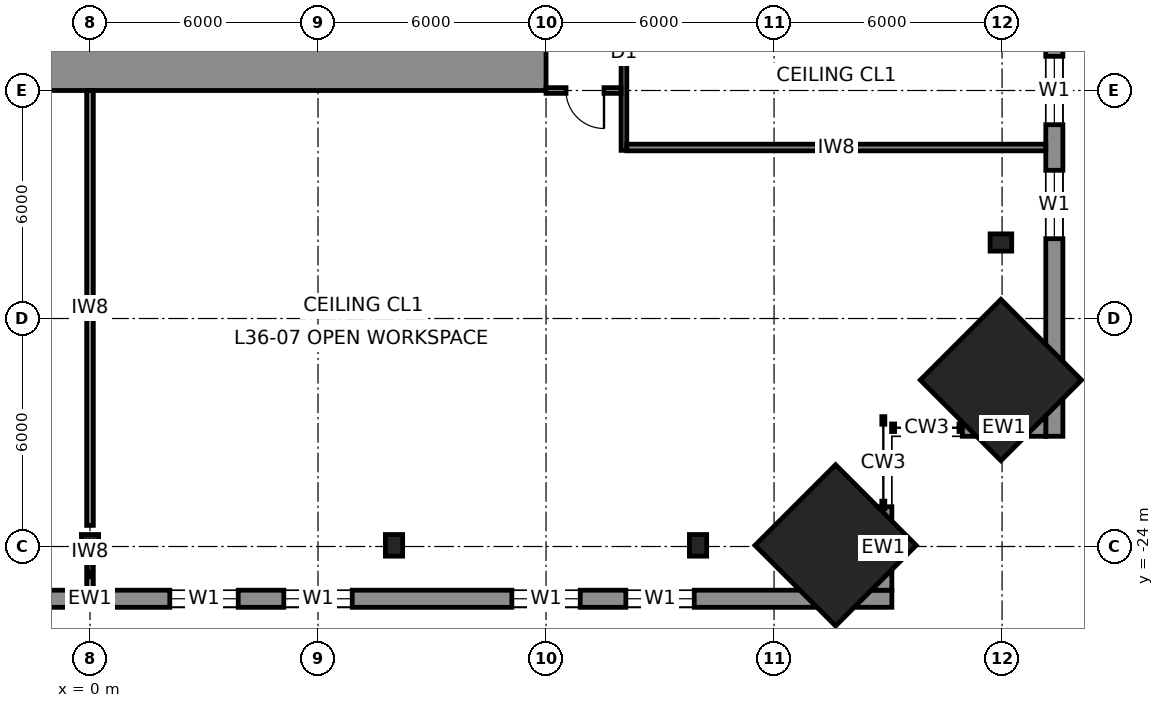
"""IFC4 building model, lengths in metres.
Left out: names, types, materials, properties, quantities, classifications, styles, units other than length and angle.
Written with IfcOpenShell. Run it as: python <this file> out.ifc"""

import sys

from ifc_helpers import new_model, si_unit, direction, frame, frame_2d, origin, origin_2d, place, context, subcontext, project, spatial, rectangle, i_section, extrude, element, fill, save


model = new_model("IFC4")
c1 = context("Model", 3, precision=1e-05, world=origin(), true_north=direction((0.0, 1.0)))
c2 = subcontext(c1, "Body", "Model", "MODEL_VIEW")
j1 = project(units=[si_unit("LENGTHUNIT", "METRE"), si_unit("PLANEANGLEUNIT", "RADIAN")], contexts=[c1])
p1 = place(None, origin())
s1 = spatial("IfcSite", under=j1, at=p1, CompositionType="ELEMENT")
p2 = place(p1, origin())
s2 = spatial("IfcBuilding", under=s1, at=p2, CompositionType="ELEMENT")
p3 = place(p2, frame((0.0, 0.0, 171.8)))
s3 = spatial("IfcBuildingStorey", under=s2, at=p3, CompositionType="ELEMENT", Elevation=171.8)
for number, where, z_axis, x_axis in (
    (1, (23.969, -19.619, 0.0), (-0.04, 0.04, 0.998), (-0.708, -0.707, 0.0)),
    (2, (19.619, -23.969, 0.0), (-0.04, 0.04, 0.998), (-0.707, -0.708, 0.0)),
):
    element("IfcColumn", number, at=place(p3, frame(where, z_axis=z_axis, x_axis=x_axis)), inside=s3, PredefinedType="COLUMN", context=c2, shape_type="SweptSolid", body=[
        extrude(rectangle(XDim=3.0, YDim=3.0, at=origin_2d()), origin(), (0.0, 0.0, 1.0), 4.007),
    ])
for number, where, z_axis, x_axis in (
    (3, (23.969, -16.0, 0.0), (-0.04, 0.0, 0.999), (0.0, -1.0, 0.0)),
    (4, (0.0, -23.969, 0.0), (0.0, 0.04, 0.999), (-1.0, 0.0, 0.0)),
    (5, (8.0, -23.969, 0.0), (0.0, 0.04, 0.999), (-1.0, 0.0, 0.0)),
    (6, (16.0, -23.969, 0.0), (0.0, 0.04, 0.999), (-1.0, 0.0, 0.0)),
):
    element("IfcColumn", number, at=place(p3, frame(where, z_axis=z_axis, x_axis=x_axis)), inside=s3, PredefinedType="COLUMN", context=c2, shape_type="SweptSolid", body=[
        extrude(i_section(OverallWidth=0.454, OverallDepth=0.569, WebThickness=0.078, FlangeThickness=0.125, at=origin_2d()), origin(), (0.0, 0.0, 1.0), 4.003),
    ])
p4 = place(p3, frame((12.0, -11.25, 0.0), z_axis=(0.0, 0.0, 1.0), x_axis=(-1.0, 0.0, 0.0)))
e7 = element("IfcWall", 7, at=p4, inside=s3, PredefinedType="SHEAR", context=c2, shape_type="SweptSolid", body=[
    extrude(rectangle(XDim=24.0, YDim=1.5, at=frame_2d((12.0, 0.0))), origin(), (0.0, 0.0, 1.0), 4.0),
])
p5 = place(p3, frame((25.375, -21.1, 0.0), z_axis=(0.0, 0.0, 1.0), x_axis=(0.0, 1.0, 0.0)))
e8 = element("IfcWall", 8, at=p5, inside=s3, PredefinedType="SOLIDWALL", context=c2, shape_type="SweptSolid", body=[
    extrude(rectangle(XDim=42.2, YDim=0.45, at=frame_2d((21.1, 0.0))), origin(), (0.0, 0.0, 1.0), 3.83),
])
p6 = place(p5, frame((5.2, 0.0, 0.7)))
e9 = element("IfcOpeningElement", 9, at=p6, cuts=e8, PredefinedType="OPENING", context=c2, shape_type="SweptSolid", body=[
    extrude(rectangle(XDim=1.8, YDim=2.6, at=frame_2d((0.9, 1.3))), frame((0.0, 0.235, 0.0), z_axis=(0.0, -1.0, 0.0), x_axis=(1.0, 0.0, 0.0)), (0.0, 0.0, 1.0), 0.47),
])
p7 = place(p5, frame((8.2, 0.0, 0.7)))
e10 = element("IfcOpeningElement", 10, at=p7, cuts=e8, PredefinedType="OPENING", context=c2, shape_type="SweptSolid", body=[
    extrude(rectangle(XDim=1.8, YDim=2.6, at=frame_2d((0.9, 1.3))), frame((0.0, 0.235, 0.0), z_axis=(0.0, -1.0, 0.0), x_axis=(1.0, 0.0, 0.0)), (0.0, 0.0, 1.0), 0.47),
])
p8 = place(p5, frame((14.2, 0.0, 0.7)))
e11 = element("IfcOpeningElement", 11, at=p8, cuts=e8, PredefinedType="OPENING", context=c2, shape_type="SweptSolid", body=[
    extrude(rectangle(XDim=1.8, YDim=2.6, at=frame_2d((0.9, 1.3))), frame((0.0, 0.235, 0.0), z_axis=(0.0, -1.0, 0.0), x_axis=(1.0, 0.0, 0.0)), (0.0, 0.0, 1.0), 0.47),
])
p9 = place(p5, frame((17.2, 0.0, 0.7)))
e12 = element("IfcOpeningElement", 12, at=p9, cuts=e8, PredefinedType="OPENING", context=c2, shape_type="SweptSolid", body=[
    extrude(rectangle(XDim=1.8, YDim=2.6, at=frame_2d((0.9, 1.3))), frame((0.0, 0.235, 0.0), z_axis=(0.0, -1.0, 0.0), x_axis=(1.0, 0.0, 0.0)), (0.0, 0.0, 1.0), 0.47),
])
p10 = place(p5, frame((23.2, 0.0, 0.7)))
e13 = element("IfcOpeningElement", 13, at=p10, cuts=e8, PredefinedType="OPENING", context=c2, shape_type="SweptSolid", body=[
    extrude(rectangle(XDim=1.8, YDim=2.6, at=frame_2d((0.9, 1.3))), frame((0.0, 0.235, 0.0), z_axis=(0.0, -1.0, 0.0), x_axis=(1.0, 0.0, 0.0)), (0.0, 0.0, 1.0), 0.47),
])
p11 = place(p5, frame((26.2, 0.0, 0.7)))
e14 = element("IfcOpeningElement", 14, at=p11, cuts=e8, PredefinedType="OPENING", context=c2, shape_type="SweptSolid", body=[
    extrude(rectangle(XDim=1.8, YDim=2.6, at=frame_2d((0.9, 1.3))), frame((0.0, 0.235, 0.0), z_axis=(0.0, -1.0, 0.0), x_axis=(1.0, 0.0, 0.0)), (0.0, 0.0, 1.0), 0.47),
])
p12 = place(p5, frame((32.2, 0.0, 0.7)))
e15 = element("IfcOpeningElement", 15, at=p12, cuts=e8, PredefinedType="OPENING", context=c2, shape_type="SweptSolid", body=[
    extrude(rectangle(XDim=1.8, YDim=2.6, at=frame_2d((0.9, 1.3))), frame((0.0, 0.235, 0.0), z_axis=(0.0, -1.0, 0.0), x_axis=(1.0, 0.0, 0.0)), (0.0, 0.0, 1.0), 0.47),
])
p13 = place(p5, frame((35.2, 0.0, 0.7)))
e16 = element("IfcOpeningElement", 16, at=p13, cuts=e8, PredefinedType="OPENING", context=c2, shape_type="SweptSolid", body=[
    extrude(rectangle(XDim=1.8, YDim=2.6, at=frame_2d((0.9, 1.3))), frame((0.0, 0.235, 0.0), z_axis=(0.0, -1.0, 0.0), x_axis=(1.0, 0.0, 0.0)), (0.0, 0.0, 1.0), 0.47),
])
p14 = place(p3, frame((-21.1, -25.375, 0.0), z_axis=(0.0, 0.0, 1.0), x_axis=(1.0, 0.0, 0.0)))
e17 = element("IfcWall", 17, at=p14, inside=s3, PredefinedType="SOLIDWALL", context=c2, shape_type="SweptSolid", body=[
    extrude(rectangle(XDim=42.2, YDim=0.45, at=frame_2d((21.1, 0.0))), origin(), (0.0, 0.0, 1.0), 3.83),
])
p15 = place(p14, frame((5.2, 0.0, 0.7)))
e18 = element("IfcOpeningElement", 18, at=p15, cuts=e17, PredefinedType="OPENING", context=c2, shape_type="SweptSolid", body=[
    extrude(rectangle(XDim=1.8, YDim=2.6, at=frame_2d((0.9, 1.3))), frame((0.0, 0.235, 0.0), z_axis=(0.0, -1.0, 0.0), x_axis=(1.0, 0.0, 0.0)), (0.0, 0.0, 1.0), 0.47),
])
p16 = place(p14, frame((8.2, 0.0, 0.7)))
e19 = element("IfcOpeningElement", 19, at=p16, cuts=e17, PredefinedType="OPENING", context=c2, shape_type="SweptSolid", body=[
    extrude(rectangle(XDim=1.8, YDim=2.6, at=frame_2d((0.9, 1.3))), frame((0.0, 0.235, 0.0), z_axis=(0.0, -1.0, 0.0), x_axis=(1.0, 0.0, 0.0)), (0.0, 0.0, 1.0), 0.47),
])
p17 = place(p14, frame((14.2, 0.0, 0.7)))
e20 = element("IfcOpeningElement", 20, at=p17, cuts=e17, PredefinedType="OPENING", context=c2, shape_type="SweptSolid", body=[
    extrude(rectangle(XDim=1.8, YDim=2.6, at=frame_2d((0.9, 1.3))), frame((0.0, 0.235, 0.0), z_axis=(0.0, -1.0, 0.0), x_axis=(1.0, 0.0, 0.0)), (0.0, 0.0, 1.0), 0.47),
])
p18 = place(p14, frame((17.2, 0.0, 0.7)))
e21 = element("IfcOpeningElement", 21, at=p18, cuts=e17, PredefinedType="OPENING", context=c2, shape_type="SweptSolid", body=[
    extrude(rectangle(XDim=1.8, YDim=2.6, at=frame_2d((0.9, 1.3))), frame((0.0, 0.235, 0.0), z_axis=(0.0, -1.0, 0.0), x_axis=(1.0, 0.0, 0.0)), (0.0, 0.0, 1.0), 0.47),
])
p19 = place(p14, frame((23.2, 0.0, 0.7)))
e22 = element("IfcOpeningElement", 22, at=p19, cuts=e17, PredefinedType="OPENING", context=c2, shape_type="SweptSolid", body=[
    extrude(rectangle(XDim=1.8, YDim=2.6, at=frame_2d((0.9, 1.3))), frame((0.0, 0.235, 0.0), z_axis=(0.0, -1.0, 0.0), x_axis=(1.0, 0.0, 0.0)), (0.0, 0.0, 1.0), 0.47),
])
p20 = place(p14, frame((26.2, 0.0, 0.7)))
e23 = element("IfcOpeningElement", 23, at=p20, cuts=e17, PredefinedType="OPENING", context=c2, shape_type="SweptSolid", body=[
    extrude(rectangle(XDim=1.8, YDim=2.6, at=frame_2d((0.9, 1.3))), frame((0.0, 0.235, 0.0), z_axis=(0.0, -1.0, 0.0), x_axis=(1.0, 0.0, 0.0)), (0.0, 0.0, 1.0), 0.47),
])
p21 = place(p14, frame((32.2, 0.0, 0.7)))
e24 = element("IfcOpeningElement", 24, at=p21, cuts=e17, PredefinedType="OPENING", context=c2, shape_type="SweptSolid", body=[
    extrude(rectangle(XDim=1.8, YDim=2.6, at=frame_2d((0.9, 1.3))), frame((0.0, 0.235, 0.0), z_axis=(0.0, -1.0, 0.0), x_axis=(1.0, 0.0, 0.0)), (0.0, 0.0, 1.0), 0.47),
])
p22 = place(p14, frame((35.2, 0.0, 0.7)))
e25 = element("IfcOpeningElement", 25, at=p22, cuts=e17, PredefinedType="OPENING", context=c2, shape_type="SweptSolid", body=[
    extrude(rectangle(XDim=1.8, YDim=2.6, at=frame_2d((0.9, 1.3))), frame((0.0, 0.235, 0.0), z_axis=(0.0, -1.0, 0.0), x_axis=(1.0, 0.0, 0.0)), (0.0, 0.0, 1.0), 0.47),
])
for number, where, z_axis, x_axis in (
    (26, (20.875, -22.954, 0.0), (0.0, 0.0, 1.0), (0.0, -1.0, 0.0)),
    (27, (22.954, -20.875, 0.0), (0.0, 0.0, 1.0), (1.0, 0.0, 0.0)),
):
    element("IfcWall", number, at=place(p3, frame(where, z_axis=z_axis, x_axis=x_axis)), inside=s3, PredefinedType="SOLIDWALL", context=c2, shape_type="SweptSolid", body=[
        extrude(rectangle(XDim=2.196, YDim=0.45, at=frame_2d((1.098, 0.0))), origin(), (0.0, 0.0, 1.0), 3.83),
    ])
p23 = place(p3, frame((14.05, -13.575, 0.0), z_axis=(0.0, 0.0, 1.0), x_axis=(0.0, 1.0, 0.0)))
e28 = element("IfcWall", 28, at=p23, inside=s3, PredefinedType="PARTITIONING", context=c2, shape_type="SweptSolid", body=[
    extrude(rectangle(XDim=27.55, YDim=0.15, at=frame_2d((13.775, 0.0))), origin(), (0.0, 0.0, 1.0), 3.83),
])
p24 = place(p23, frame((3.175, 0.0, 0.0)))
e29 = element("IfcOpeningElement", 29, at=p24, cuts=e28, PredefinedType="OPENING", context=c2, shape_type="SweptSolid", body=[
    extrude(rectangle(XDim=1.0, YDim=2.3, at=frame_2d((0.5, 1.15))), frame((0.0, 0.085, 0.0), z_axis=(0.0, -1.0, 0.0), x_axis=(1.0, 0.0, 0.0)), (0.0, 0.0, 1.0), 0.17),
])
p25 = place(p23, frame((22.375, 0.0, 0.0)))
e30 = element("IfcOpeningElement", 30, at=p25, cuts=e28, PredefinedType="OPENING", context=c2, shape_type="SweptSolid", body=[
    extrude(rectangle(XDim=1.6, YDim=2.3, at=frame_2d((0.8, 1.15))), frame((0.0, 0.085, 0.0), z_axis=(0.0, -1.0, 0.0), x_axis=(1.0, 0.0, 0.0)), (0.0, 0.0, 1.0), 0.17),
])
p26 = place(p23, frame((16.825, 0.0, 0.0)))
e31 = element("IfcOpeningElement", 31, at=p26, cuts=e28, PredefinedType="OPENING", context=c2, shape_type="SweptSolid", body=[
    extrude(rectangle(XDim=1.0, YDim=2.3, at=frame_2d((0.5, 1.15))), frame((0.0, 0.085, 0.0), z_axis=(0.0, -1.0, 0.0), x_axis=(1.0, 0.0, 0.0)), (0.0, 0.0, 1.0), 0.17),
])
p27 = place(p23, frame((9.825, 0.0, 0.0)))
e32 = element("IfcOpeningElement", 32, at=p27, cuts=e28, PredefinedType="OPENING", context=c2, shape_type="SweptSolid", body=[
    extrude(rectangle(XDim=1.0, YDim=2.3, at=frame_2d((0.5, 1.15))), frame((0.0, 0.085, 0.0), z_axis=(0.0, -1.0, 0.0), x_axis=(1.0, 0.0, 0.0)), (0.0, 0.0, 1.0), 0.17),
])
p28 = place(p3, frame((13.975, -12.0, 0.0), z_axis=(0.0, 0.0, 1.0), x_axis=(-1.0, 0.0, 0.0)))
e33 = element("IfcWall", 33, at=p28, inside=s3, PredefinedType="PARTITIONING", context=c2, shape_type="SweptSolid", body=[
    extrude(rectangle(XDim=1.975, YDim=0.15, at=frame_2d((0.988, 0.0))), origin(), (0.0, 0.0, 1.0), 3.83),
])
p29 = place(p28, frame((0.45, 0.0, 0.0)))
e34 = element("IfcOpeningElement", 34, at=p29, cuts=e33, PredefinedType="OPENING", context=c2, shape_type="SweptSolid", body=[
    extrude(rectangle(XDim=1.0, YDim=2.3, at=frame_2d((0.5, 1.15))), frame((0.0, 0.085, 0.0), z_axis=(0.0, -1.0, 0.0), x_axis=(1.0, 0.0, 0.0)), (0.0, 0.0, 1.0), 0.17),
])
p30 = place(p3, frame((25.15, -13.5, 0.0), z_axis=(0.0, 0.0, 1.0), x_axis=(-1.0, 0.0, 0.0)))
e35 = element("IfcWall", 35, at=p30, inside=s3, PredefinedType="PARTITIONING", context=c2, shape_type="SweptSolid", body=[
    extrude(rectangle(XDim=11.025, YDim=0.175, at=frame_2d((5.512, 0.0))), origin(), (0.0, 0.0, 1.0), 3.83),
])
p31 = place(p3, frame((0.0, -12.0, 0.0), z_axis=(0.0, 0.0, 1.0), x_axis=(0.0, -1.0, 0.0)))
e36 = element("IfcWall", 36, at=p31, inside=s3, PredefinedType="PARTITIONING", context=c2, shape_type="SweptSolid", body=[
    extrude(rectangle(XDim=11.444, YDim=0.175, at=frame_2d((5.722, 0.0))), origin(), (0.0, 0.0, 1.0), 2.84),
])
p32 = place(p3, frame((0.0, -24.333, 0.0), z_axis=(0.0, 0.0, 1.0), x_axis=(0.0, -1.0, 0.0)))
e37 = element("IfcWall", 37, at=p32, inside=s3, PredefinedType="PARTITIONING", context=c2, shape_type="SweptSolid", body=[
    extrude(rectangle(XDim=0.817, YDim=0.175, at=frame_2d((0.408, 0.0))), origin(), (0.0, 0.0, 1.0), 3.83),
])
p33 = place(p6, origin())
e38 = element("IfcWindow", 38, at=p33, inside=s3, PartitioningType="SINGLE_PANEL", PredefinedType="WINDOW", context=c2, shape_type="SweptSolid", body=[
    extrude(rectangle(XDim=1.8, YDim=2.6, at=frame_2d((0.9, 1.3))), frame((0.0, 0.03, 0.0), z_axis=(0.0, -1.0, 0.0), x_axis=(1.0, 0.0, 0.0)), (0.0, 0.0, 1.0), 0.06),
])
fill(e9, e38)
p34 = place(p7, origin())
e39 = element("IfcWindow", 39, at=p34, inside=s3, PartitioningType="SINGLE_PANEL", PredefinedType="WINDOW", context=c2, shape_type="SweptSolid", body=[
    extrude(rectangle(XDim=1.8, YDim=2.6, at=frame_2d((0.9, 1.3))), frame((0.0, 0.03, 0.0), z_axis=(0.0, -1.0, 0.0), x_axis=(1.0, 0.0, 0.0)), (0.0, 0.0, 1.0), 0.06),
])
fill(e10, e39)
p35 = place(p19, origin())
e40 = element("IfcWindow", 40, at=p35, inside=s3, PartitioningType="SINGLE_PANEL", PredefinedType="WINDOW", context=c2, shape_type="SweptSolid", body=[
    extrude(rectangle(XDim=1.8, YDim=2.6, at=frame_2d((0.9, 1.3))), frame((0.0, 0.03, 0.0), z_axis=(0.0, -1.0, 0.0), x_axis=(1.0, 0.0, 0.0)), (0.0, 0.0, 1.0), 0.06),
])
fill(e22, e40)
p36 = place(p20, origin())
e41 = element("IfcWindow", 41, at=p36, inside=s3, PartitioningType="SINGLE_PANEL", PredefinedType="WINDOW", context=c2, shape_type="SweptSolid", body=[
    extrude(rectangle(XDim=1.8, YDim=2.6, at=frame_2d((0.9, 1.3))), frame((0.0, 0.03, 0.0), z_axis=(0.0, -1.0, 0.0), x_axis=(1.0, 0.0, 0.0)), (0.0, 0.0, 1.0), 0.06),
])
fill(e23, e41)
p37 = place(p21, origin())
e42 = element("IfcWindow", 42, at=p37, inside=s3, PartitioningType="SINGLE_PANEL", PredefinedType="WINDOW", context=c2, shape_type="SweptSolid", body=[
    extrude(rectangle(XDim=1.8, YDim=2.6, at=frame_2d((0.9, 1.3))), frame((0.0, 0.03, 0.0), z_axis=(0.0, -1.0, 0.0), x_axis=(1.0, 0.0, 0.0)), (0.0, 0.0, 1.0), 0.06),
])
fill(e24, e42)
p38 = place(p22, origin())
e43 = element("IfcWindow", 43, at=p38, inside=s3, PartitioningType="SINGLE_PANEL", PredefinedType="WINDOW", context=c2, shape_type="SweptSolid", body=[
    extrude(rectangle(XDim=1.8, YDim=2.6, at=frame_2d((0.9, 1.3))), frame((0.0, 0.03, 0.0), z_axis=(0.0, -1.0, 0.0), x_axis=(1.0, 0.0, 0.0)), (0.0, 0.0, 1.0), 0.06),
])
fill(e25, e43)
p39 = place(p29, origin())
e44 = element("IfcDoor", 44, at=p39, inside=s3, OperationType="SINGLE_SWING_LEFT", PredefinedType="DOOR", context=c2, shape_type="SweptSolid", body=[
    extrude(rectangle(XDim=1.0, YDim=2.3, at=frame_2d((0.5, 1.15))), frame((0.0, 0.025, 0.0), z_axis=(0.0, -1.0, 0.0), x_axis=(1.0, 0.0, 0.0)), (0.0, 0.0, 1.0), 0.05),
])
fill(e34, e44)
save(model, sys.argv[1])
